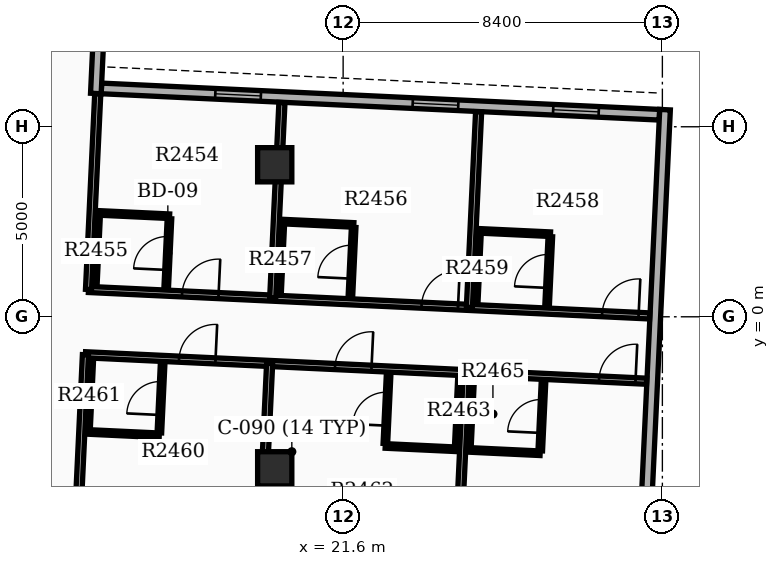
"""IFC4 building model, lengths in metres.
Left out: names, types, materials, properties, quantities, classifications, styles, units other than length and angle.
Written with IfcOpenShell. Run it as: python <this file> out.ifc"""

import sys

from ifc_helpers import new_model, si_unit, direction, frame, frame_2d, origin, origin_2d, place, context, subcontext, project, spatial, rectangle, extrude, element, fill, save


model = new_model("IFC4")
c1 = context("Model", 3, precision=1e-05, world=origin(), true_north=direction((0.0, 1.0)))
c2 = subcontext(c1, "Body", "Model", "MODEL_VIEW")
j1 = project(units=[si_unit("LENGTHUNIT", "METRE"), si_unit("PLANEANGLEUNIT", "RADIAN")], contexts=[c1])
p1 = place(None, origin())
s1 = spatial("IfcSite", under=j1, at=p1, CompositionType="ELEMENT")
p2 = place(p1, origin())
s2 = spatial("IfcBuilding", under=s1, at=p2, CompositionType="ELEMENT")
p3 = place(p2, frame((0.0, 0.0, 156.6)))
s3 = spatial("IfcBuildingStorey", under=s2, at=p3, CompositionType="ELEMENT", Elevation=156.6)
for number, where, z_axis, x_axis in (
    (1, (19.8, -4.0, 0.0), (0.0, 0.0, 1.0), (1.0, 0.0, 0.0)),
    (2, (19.8, 4.0, 0.0), (0.0, 0.0, 1.0), (1.0, 0.0, 0.0)),
):
    element("IfcColumn", number, at=place(p3, frame(where, z_axis=z_axis, x_axis=x_axis)), inside=s3, PredefinedType="COLUMN", context=c2, shape_type="SweptSolid", body=[
        extrude(rectangle(XDim=0.9, YDim=0.9, at=origin_2d()), origin(), (0.0, 0.0, 1.0), 3.9),
    ])
p4 = place(p3, frame((29.924, 5.316, 0.0), z_axis=(0.0, 0.0, 1.0), x_axis=(-0.998890124275, 0.047101163748, 0.0)))
e3 = element("IfcWall", 3, at=p4, inside=s3, PredefinedType="STANDARD", context=c2, shape_type="SweptSolid", body=[
    extrude(rectangle(XDim=14.7, YDim=0.28, at=frame_2d((7.35, 0.0))), origin(), (0.0, 0.0, 1.0), 2.97),
])
p5 = place(p4, frame((1.6, 0.0, 0.8)))
e4 = element("IfcOpeningElement", 4, at=p5, cuts=e3, PredefinedType="OPENING", context=c2, shape_type="SweptSolid", body=[
    extrude(rectangle(XDim=1.2, YDim=1.6, at=frame_2d((0.6, 0.8))), frame((0.0, 0.15, 0.0), z_axis=(0.0, -1.0, 0.0), x_axis=(1.0, 0.0, 0.0)), (0.0, 0.0, 1.0), 0.3),
])
p6 = place(p4, frame((5.3, 0.0, 0.8)))
e5 = element("IfcOpeningElement", 5, at=p6, cuts=e3, PredefinedType="OPENING", context=c2, shape_type="SweptSolid", body=[
    extrude(rectangle(XDim=1.2, YDim=1.6, at=frame_2d((0.6, 0.8))), frame((0.0, 0.15, 0.0), z_axis=(0.0, -1.0, 0.0), x_axis=(1.0, 0.0, 0.0)), (0.0, 0.0, 1.0), 0.3),
])
p7 = place(p4, frame((10.5, 0.0, 0.8)))
e6 = element("IfcOpeningElement", 6, at=p7, cuts=e3, PredefinedType="OPENING", context=c2, shape_type="SweptSolid", body=[
    extrude(rectangle(XDim=1.2, YDim=1.6, at=frame_2d((0.6, 0.8))), frame((0.0, 0.15, 0.0), z_axis=(0.0, -1.0, 0.0), x_axis=(1.0, 0.0, 0.0)), (0.0, 0.0, 1.0), 0.3),
])
p8 = place(p3, frame((29.424, -8.255, 0.0), z_axis=(0.0, 0.0, 1.0), x_axis=(0.047101845086, 0.998890092147, 0.0)))
e7 = element("IfcWall", 7, at=p8, inside=s3, PredefinedType="STANDARD", context=c2, shape_type="SweptSolid", body=[
    extrude(rectangle(XDim=13.72, YDim=0.28, at=frame_2d((6.86, 0.0))), origin(), (0.0, 0.0, 1.0), 2.97),
])
p9 = place(p8, frame((0.85, 0.0, 0.85)))
e8 = element("IfcOpeningElement", 8, at=p9, cuts=e7, PredefinedType="OPENING", context=c2, shape_type="SweptSolid", body=[
    extrude(rectangle(XDim=1.0, YDim=1.5, at=frame_2d((0.5, 0.75))), frame((0.0, 0.15, 0.0), z_axis=(0.0, -1.0, 0.0), x_axis=(1.0, 0.0, 0.0)), (0.0, 0.0, 1.0), 0.3),
])
p10 = place(p3, frame((15.094, 5.875, 0.0), z_axis=(0.0, 0.0, 1.0), x_axis=(0.04712043756, 0.998889215261, 0.0)))
e9 = element("IfcWall", 9, at=p10, inside=s3, PredefinedType="STANDARD", context=c2, shape_type="SweptSolid", body=[
    extrude(rectangle(XDim=6.86, YDim=0.28, at=frame_2d((3.43, 0.0))), origin(), (0.0, 0.0, 1.0), 2.97),
])
p11 = place(p3, frame((14.9, 0.719, 0.0), z_axis=(0.0, 0.0, 1.0), x_axis=(0.99889000272, -0.04710374153, 0.0)))
e10 = element("IfcWall", 10, at=p11, inside=s3, PredefinedType="PARTITIONING", context=c2, shape_type="SweptSolid", body=[
    extrude(rectangle(XDim=14.782, YDim=0.16, at=frame_2d((7.391, 0.0))), origin(), (0.0, 0.0, 1.0), 2.96),
])
p12 = place(p11, frame((2.465, 0.0, 0.0)))
e11 = element("IfcOpeningElement", 11, at=p12, cuts=e10, PredefinedType="OPENING", context=c2, shape_type="SweptSolid", body=[
    extrude(rectangle(XDim=0.96, YDim=2.15, at=frame_2d((0.48, 1.075))), frame((0.0, 0.09, 0.0), z_axis=(0.0, -1.0, 0.0), x_axis=(1.0, 0.0, 0.0)), (0.0, 0.0, 1.0), 0.18),
])
p13 = place(p11, frame((8.773, 0.0, 0.0)))
e12 = element("IfcOpeningElement", 12, at=p13, cuts=e10, PredefinedType="OPENING", context=c2, shape_type="SweptSolid", body=[
    extrude(rectangle(XDim=0.96, YDim=2.15, at=frame_2d((0.48, 1.075))), frame((0.0, 0.09, 0.0), z_axis=(0.0, -1.0, 0.0), x_axis=(1.0, 0.0, 0.0)), (0.0, 0.0, 1.0), 0.18),
])
p14 = place(p11, frame((13.53, 0.0, 0.0)))
e13 = element("IfcOpeningElement", 13, at=p14, cuts=e10, PredefinedType="OPENING", context=c2, shape_type="SweptSolid", body=[
    extrude(rectangle(XDim=0.96, YDim=2.15, at=frame_2d((0.48, 1.075))), frame((0.0, 0.09, 0.0), z_axis=(0.0, -1.0, 0.0), x_axis=(1.0, 0.0, 0.0)), (0.0, 0.0, 1.0), 0.18),
])
p15 = place(p3, frame((14.9, 0.719, 0.0), z_axis=(0.0, 0.0, 1.0), x_axis=(0.047103594553, 0.998890009651, 0.0)))
e14 = element("IfcWall", 14, at=p15, inside=s3, PredefinedType="PARTITIONING", context=c2, shape_type="SweptSolid", body=[
    extrude(rectangle(XDim=5.152, YDim=0.16, at=frame_2d((2.576, 0.0))), origin(), (0.0, 0.0, 1.0), 2.96),
])
p16 = place(p3, frame((19.747, 0.49, 0.0), z_axis=(0.0, 0.0, 1.0), x_axis=(0.047101364995, 0.998890114785, 0.0)))
e15 = element("IfcWall", 15, at=p16, inside=s3, PredefinedType="PARTITIONING", context=c2, shape_type="SweptSolid", body=[
    extrude(rectangle(XDim=5.152, YDim=0.16, at=frame_2d((2.576, 0.0))), origin(), (0.0, 0.0, 1.0), 2.96),
])
p17 = place(p3, frame((16.945, 0.763, 0.0), z_axis=(0.0, 0.0, 1.0), x_axis=(0.047220968666, 0.998884467853, 0.0)))
e16 = element("IfcWall", 16, at=p17, inside=s3, PredefinedType="PARTITIONING", context=c2, shape_type="SweptSolid", body=[
    extrude(rectangle(XDim=1.82, YDim=0.12, at=frame_2d((0.91, 0.0))), origin(), (0.0, 0.0, 1.0), 2.96),
])
p18 = place(p17, frame((0.47, 0.0, 0.0)))
e17 = element("IfcOpeningElement", 17, at=p18, cuts=e16, PredefinedType="OPENING", context=c2, shape_type="SweptSolid", body=[
    extrude(rectangle(XDim=0.88, YDim=2.1, at=frame_2d((0.44, 1.05))), frame((0.0, 0.07, 0.0), z_axis=(0.0, -1.0, 0.0), x_axis=(1.0, 0.0, 0.0)), (0.0, 0.0, 1.0), 0.14),
])
p19 = place(p3, frame((15.067, 0.851, 0.0), z_axis=(0.0, 0.0, 1.0), x_axis=(0.047087116047, 0.998890786574, 0.0)))
e18 = element("IfcWall", 18, at=p19, inside=s3, PredefinedType="PARTITIONING", context=c2, shape_type="SweptSolid", body=[
    extrude(rectangle(XDim=1.82, YDim=0.12, at=frame_2d((0.91, 0.0))), origin(), (0.0, 0.0, 1.0), 2.96),
])
p20 = place(p3, frame((15.156, 2.734, 0.0), z_axis=(0.0, 0.0, 1.0), x_axis=(0.998888319371, -0.047139425368, 0.0)))
e19 = element("IfcWall", 19, at=p20, inside=s3, PredefinedType="PARTITIONING", context=c2, shape_type="SweptSolid", body=[
    extrude(rectangle(XDim=1.88, YDim=0.12, at=frame_2d((0.94, 0.0))), origin(), (0.0, 0.0, 1.0), 2.96),
])
p21 = place(p3, frame((24.922, 0.246, 0.0), z_axis=(0.0, 0.0, 1.0), x_axis=(0.047056311615, 0.9988922382, 0.0)))
e20 = element("IfcWall", 20, at=p21, inside=s3, PredefinedType="PARTITIONING", context=c2, shape_type="SweptSolid", body=[
    extrude(rectangle(XDim=5.152, YDim=0.16, at=frame_2d((2.576, 0.0))), origin(), (0.0, 0.0, 1.0), 2.96),
])
p22 = place(p3, frame((21.791, 0.534, 0.0), z_axis=(0.0, 0.0, 1.0), x_axis=(0.047220968666, 0.998884467853, 0.0)))
e21 = element("IfcWall", 21, at=p22, inside=s3, PredefinedType="PARTITIONING", context=c2, shape_type="SweptSolid", body=[
    extrude(rectangle(XDim=1.82, YDim=0.12, at=frame_2d((0.91, 0.0))), origin(), (0.0, 0.0, 1.0), 2.96),
])
p23 = place(p22, frame((0.47, 0.0, 0.0)))
e22 = element("IfcOpeningElement", 22, at=p23, cuts=e21, PredefinedType="OPENING", context=c2, shape_type="SweptSolid", body=[
    extrude(rectangle(XDim=0.88, YDim=2.1, at=frame_2d((0.44, 1.05))), frame((0.0, 0.07, 0.0), z_axis=(0.0, -1.0, 0.0), x_axis=(1.0, 0.0, 0.0)), (0.0, 0.0, 1.0), 0.14),
])
p24 = place(p3, frame((19.913, 0.623, 0.0), z_axis=(0.0, 0.0, 1.0), x_axis=(0.047214641863, 0.998884766924, 0.0)))
e23 = element("IfcWall", 23, at=p24, inside=s3, PredefinedType="PARTITIONING", context=c2, shape_type="SweptSolid", body=[
    extrude(rectangle(XDim=1.82, YDim=0.12, at=frame_2d((0.91, 0.0))), origin(), (0.0, 0.0, 1.0), 2.96),
])
p25 = place(p3, frame((20.002, 2.506, 0.0), z_axis=(0.0, 0.0, 1.0), x_axis=(0.998888319371, -0.047139425368, 0.0)))
e24 = element("IfcWall", 24, at=p25, inside=s3, PredefinedType="PARTITIONING", context=c2, shape_type="SweptSolid", body=[
    extrude(rectangle(XDim=1.88, YDim=0.12, at=frame_2d((0.94, 0.0))), origin(), (0.0, 0.0, 1.0), 2.96),
])
p26 = place(p3, frame((26.967, 0.29, 0.0), z_axis=(0.0, 0.0, 1.0), x_axis=(0.047087116047, 0.998890786574, 0.0)))
e25 = element("IfcWall", 25, at=p26, inside=s3, PredefinedType="PARTITIONING", context=c2, shape_type="SweptSolid", body=[
    extrude(rectangle(XDim=1.82, YDim=0.12, at=frame_2d((0.91, 0.0))), origin(), (0.0, 0.0, 1.0), 2.96),
])
p27 = place(p26, frame((0.47, 0.0, 0.0)))
e26 = element("IfcOpeningElement", 26, at=p27, cuts=e25, PredefinedType="OPENING", context=c2, shape_type="SweptSolid", body=[
    extrude(rectangle(XDim=0.88, YDim=2.1, at=frame_2d((0.44, 1.05))), frame((0.0, 0.07, 0.0), z_axis=(0.0, -1.0, 0.0), x_axis=(1.0, 0.0, 0.0)), (0.0, 0.0, 1.0), 0.14),
])
p28 = place(p3, frame((25.089, 0.379, 0.0), z_axis=(0.0, 0.0, 1.0), x_axis=(0.047087116047, 0.998890786574, 0.0)))
e27 = element("IfcWall", 27, at=p28, inside=s3, PredefinedType="PARTITIONING", context=c2, shape_type="SweptSolid", body=[
    extrude(rectangle(XDim=1.82, YDim=0.12, at=frame_2d((0.91, 0.0))), origin(), (0.0, 0.0, 1.0), 2.96),
])
p29 = place(p3, frame((25.177, 2.261, 0.0), z_axis=(0.0, 0.0, 1.0), x_axis=(0.998888319371, -0.047139425368, 0.0)))
e28 = element("IfcWall", 28, at=p29, inside=s3, PredefinedType="PARTITIONING", context=c2, shape_type="SweptSolid", body=[
    extrude(rectangle(XDim=1.88, YDim=0.12, at=frame_2d((0.94, 0.0))), origin(), (0.0, 0.0, 1.0), 2.96),
])
p30 = place(p3, frame((14.819, -0.999, 0.0), z_axis=(0.0, 0.0, 1.0), x_axis=(0.99889000272, -0.04710374153, 0.0)))
e29 = element("IfcWall", 29, at=p30, inside=s3, PredefinedType="PARTITIONING", context=c2, shape_type="SweptSolid", body=[
    extrude(rectangle(XDim=14.782, YDim=0.16, at=frame_2d((7.391, 0.0))), origin(), (0.0, 0.0, 1.0), 2.96),
])
p31 = place(p30, frame((2.465, 0.0, 0.0)))
e30 = element("IfcOpeningElement", 30, at=p31, cuts=e29, PredefinedType="OPENING", context=c2, shape_type="SweptSolid", body=[
    extrude(rectangle(XDim=0.96, YDim=2.15, at=frame_2d((0.48, 1.075))), frame((0.0, 0.09, 0.0), z_axis=(0.0, -1.0, 0.0), x_axis=(1.0, 0.0, 0.0)), (0.0, 0.0, 1.0), 0.18),
])
p32 = place(p30, frame((6.575, 0.0, 0.0)))
e31 = element("IfcOpeningElement", 31, at=p32, cuts=e29, PredefinedType="OPENING", context=c2, shape_type="SweptSolid", body=[
    extrude(rectangle(XDim=0.96, YDim=2.15, at=frame_2d((0.48, 1.075))), frame((0.0, 0.09, 0.0), z_axis=(0.0, -1.0, 0.0), x_axis=(1.0, 0.0, 0.0)), (0.0, 0.0, 1.0), 0.18),
])
p33 = place(p30, frame((13.53, 0.0, 0.0)))
e32 = element("IfcOpeningElement", 32, at=p33, cuts=e29, PredefinedType="OPENING", context=c2, shape_type="SweptSolid", body=[
    extrude(rectangle(XDim=0.96, YDim=2.15, at=frame_2d((0.48, 1.075))), frame((0.0, 0.09, 0.0), z_axis=(0.0, -1.0, 0.0), x_axis=(1.0, 0.0, 0.0)), (0.0, 0.0, 1.0), 0.18),
])
for number, where, z_axis, x_axis in (
    (33, (14.819, -0.999, 0.0), (0.0, 0.0, 1.0), (-0.047, -0.999, 0.0)),
    (34, (19.666, -1.228, 0.0), (0.0, 0.0, 1.0), (-0.047, -0.999, 0.0)),
):
    element("IfcWall", number, at=place(p3, frame(where, z_axis=z_axis, x_axis=x_axis)), inside=s3, PredefinedType="PARTITIONING", context=c2, shape_type="SweptSolid", body=[
        extrude(rectangle(XDim=6.272, YDim=0.16, at=frame_2d((3.136, 0.0))), origin(), (0.0, 0.0, 1.0), 2.96),
    ])
p34 = place(p3, frame((16.765, -3.053, 0.0), z_axis=(0.0, 0.0, 1.0), x_axis=(0.047087116047, 0.998890786574, 0.0)))
e35 = element("IfcWall", 35, at=p34, inside=s3, PredefinedType="PARTITIONING", context=c2, shape_type="SweptSolid", body=[
    extrude(rectangle(XDim=1.82, YDim=0.12, at=frame_2d((0.91, 0.0))), origin(), (0.0, 0.0, 1.0), 2.96),
])
p35 = place(p34, frame((0.47, 0.0, 0.0)))
e36 = element("IfcOpeningElement", 36, at=p35, cuts=e35, PredefinedType="OPENING", context=c2, shape_type="SweptSolid", body=[
    extrude(rectangle(XDim=0.88, YDim=2.1, at=frame_2d((0.44, 1.05))), frame((0.0, 0.07, 0.0), z_axis=(0.0, -1.0, 0.0), x_axis=(1.0, 0.0, 0.0)), (0.0, 0.0, 1.0), 0.14),
])
p36 = place(p3, frame((14.887, -2.965, 0.0), z_axis=(0.0, 0.0, 1.0), x_axis=(0.047080807099, 0.998891083954, 0.0)))
e37 = element("IfcWall", 37, at=p36, inside=s3, PredefinedType="PARTITIONING", context=c2, shape_type="SweptSolid", body=[
    extrude(rectangle(XDim=1.82, YDim=0.12, at=frame_2d((0.91, 0.0))), origin(), (0.0, 0.0, 1.0), 2.96),
])
p37 = place(p3, frame((14.884, -3.03, 0.0), z_axis=(0.0, 0.0, 1.0), x_axis=(0.998894425757, -0.04700985207, 0.0)))
e38 = element("IfcWall", 38, at=p37, inside=s3, PredefinedType="PARTITIONING", context=c2, shape_type="SweptSolid", body=[
    extrude(rectangle(XDim=1.88, YDim=0.12, at=frame_2d((0.94, 0.0))), origin(), (0.0, 0.0, 1.0), 2.96),
])
p38 = place(p3, frame((24.841, -1.472, 0.0), z_axis=(0.0, 0.0, 1.0), x_axis=(-0.047099102485, -0.998890221468, 0.0)))
e39 = element("IfcWall", 39, at=p38, inside=s3, PredefinedType="PARTITIONING", context=c2, shape_type="SweptSolid", body=[
    extrude(rectangle(XDim=6.272, YDim=0.16, at=frame_2d((3.136, 0.0))), origin(), (0.0, 0.0, 1.0), 2.96),
])
p39 = place(p3, frame((22.711, -3.333, 0.0), z_axis=(0.0, 0.0, 1.0), x_axis=(0.047087116047, 0.998890786574, 0.0)))
e40 = element("IfcWall", 40, at=p39, inside=s3, PredefinedType="PARTITIONING", context=c2, shape_type="SweptSolid", body=[
    extrude(rectangle(XDim=1.82, YDim=0.12, at=frame_2d((0.91, 0.0))), origin(), (0.0, 0.0, 1.0), 2.96),
])
p40 = place(p39, frame((0.47, 0.0, 0.0)))
e41 = element("IfcOpeningElement", 41, at=p40, cuts=e40, PredefinedType="OPENING", context=c2, shape_type="SweptSolid", body=[
    extrude(rectangle(XDim=0.88, YDim=2.1, at=frame_2d((0.44, 1.05))), frame((0.0, 0.07, 0.0), z_axis=(0.0, -1.0, 0.0), x_axis=(1.0, 0.0, 0.0)), (0.0, 0.0, 1.0), 0.14),
])
p41 = place(p3, frame((24.589, -3.422, 0.0), z_axis=(0.0, 0.0, 1.0), x_axis=(0.047080807099, 0.998891083954, 0.0)))
e42 = element("IfcWall", 42, at=p41, inside=s3, PredefinedType="PARTITIONING", context=c2, shape_type="SweptSolid", body=[
    extrude(rectangle(XDim=1.82, YDim=0.12, at=frame_2d((0.91, 0.0))), origin(), (0.0, 0.0, 1.0), 2.96),
])
p42 = place(p3, frame((22.708, -3.398, 0.0), z_axis=(0.0, 0.0, 1.0), x_axis=(0.998888319371, -0.047139425368, 0.0)))
e43 = element("IfcWall", 43, at=p42, inside=s3, PredefinedType="PARTITIONING", context=c2, shape_type="SweptSolid", body=[
    extrude(rectangle(XDim=1.88, YDim=0.12, at=frame_2d((0.94, 0.0))), origin(), (0.0, 0.0, 1.0), 2.96),
])
p43 = place(p3, frame((26.787, -3.526, 0.0), z_axis=(0.0, 0.0, 1.0), x_axis=(0.047087116047, 0.998890786574, 0.0)))
e44 = element("IfcWall", 44, at=p43, inside=s3, PredefinedType="PARTITIONING", context=c2, shape_type="SweptSolid", body=[
    extrude(rectangle(XDim=1.82, YDim=0.12, at=frame_2d((0.91, 0.0))), origin(), (0.0, 0.0, 1.0), 2.96),
])
p44 = place(p43, frame((0.47, 0.0, 0.0)))
e45 = element("IfcOpeningElement", 45, at=p44, cuts=e44, PredefinedType="OPENING", context=c2, shape_type="SweptSolid", body=[
    extrude(rectangle(XDim=0.88, YDim=2.1, at=frame_2d((0.44, 1.05))), frame((0.0, 0.07, 0.0), z_axis=(0.0, -1.0, 0.0), x_axis=(1.0, 0.0, 0.0)), (0.0, 0.0, 1.0), 0.14),
])
p45 = place(p3, frame((24.909, -3.437, 0.0), z_axis=(0.0, 0.0, 1.0), x_axis=(0.047080807099, 0.998891083954, 0.0)))
e46 = element("IfcWall", 46, at=p45, inside=s3, PredefinedType="PARTITIONING", context=c2, shape_type="SweptSolid", body=[
    extrude(rectangle(XDim=1.82, YDim=0.12, at=frame_2d((0.91, 0.0))), origin(), (0.0, 0.0, 1.0), 2.96),
])
p46 = place(p3, frame((24.906, -3.502, 0.0), z_axis=(0.0, 0.0, 1.0), x_axis=(0.998888319371, -0.047139425368, 0.0)))
e47 = element("IfcWall", 47, at=p46, inside=s3, PredefinedType="PARTITIONING", context=c2, shape_type="SweptSolid", body=[
    extrude(rectangle(XDim=1.88, YDim=0.12, at=frame_2d((0.94, 0.0))), origin(), (0.0, 0.0, 1.0), 2.96),
])
p47 = place(p5, origin())
e48 = element("IfcWindow", 48, at=p47, inside=s3, PartitioningType="SINGLE_PANEL", PredefinedType="WINDOW", context=c2, shape_type="SweptSolid", body=[
    extrude(rectangle(XDim=1.2, YDim=1.6, at=frame_2d((0.6, 0.8))), frame((0.0, 0.03, 0.0), z_axis=(0.0, -1.0, 0.0), x_axis=(1.0, 0.0, 0.0)), (0.0, 0.0, 1.0), 0.06),
])
fill(e4, e48)
p48 = place(p6, origin())
e49 = element("IfcWindow", 49, at=p48, inside=s3, PartitioningType="SINGLE_PANEL", PredefinedType="WINDOW", context=c2, shape_type="SweptSolid", body=[
    extrude(rectangle(XDim=1.2, YDim=1.6, at=frame_2d((0.6, 0.8))), frame((0.0, 0.03, 0.0), z_axis=(0.0, -1.0, 0.0), x_axis=(1.0, 0.0, 0.0)), (0.0, 0.0, 1.0), 0.06),
])
fill(e5, e49)
p49 = place(p7, origin())
e50 = element("IfcWindow", 50, at=p49, inside=s3, PartitioningType="SINGLE_PANEL", PredefinedType="WINDOW", context=c2, shape_type="SweptSolid", body=[
    extrude(rectangle(XDim=1.2, YDim=1.6, at=frame_2d((0.6, 0.8))), frame((0.0, 0.03, 0.0), z_axis=(0.0, -1.0, 0.0), x_axis=(1.0, 0.0, 0.0)), (0.0, 0.0, 1.0), 0.06),
])
fill(e6, e50)
p50 = place(p12, origin())
e51 = element("IfcDoor", 51, at=p50, inside=s3, OperationType="SINGLE_SWING_RIGHT", PredefinedType="DOOR", context=c2, shape_type="SweptSolid", body=[
    extrude(rectangle(XDim=0.96, YDim=2.15, at=frame_2d((0.48, 1.075))), frame((0.0, 0.025, 0.0), z_axis=(0.0, -1.0, 0.0), x_axis=(1.0, 0.0, 0.0)), (0.0, 0.0, 1.0), 0.05),
])
fill(e11, e51)
p51 = place(p18, origin())
e52 = element("IfcDoor", 52, at=p51, inside=s3, OperationType="SINGLE_SWING_LEFT", PredefinedType="DOOR", context=c2, shape_type="SweptSolid", body=[
    extrude(rectangle(XDim=0.88, YDim=2.1, at=frame_2d((0.44, 1.05))), frame((0.0, 0.025, 0.0), z_axis=(0.0, -1.0, 0.0), x_axis=(1.0, 0.0, 0.0)), (0.0, 0.0, 1.0), 0.05),
])
fill(e17, e52)
p52 = place(p13, origin())
e53 = element("IfcDoor", 53, at=p52, inside=s3, OperationType="SINGLE_SWING_RIGHT", PredefinedType="DOOR", context=c2, shape_type="SweptSolid", body=[
    extrude(rectangle(XDim=0.96, YDim=2.15, at=frame_2d((0.48, 1.075))), frame((0.0, 0.025, 0.0), z_axis=(0.0, -1.0, 0.0), x_axis=(1.0, 0.0, 0.0)), (0.0, 0.0, 1.0), 0.05),
])
fill(e12, e53)
p53 = place(p23, origin())
e54 = element("IfcDoor", 54, at=p53, inside=s3, OperationType="SINGLE_SWING_LEFT", PredefinedType="DOOR", context=c2, shape_type="SweptSolid", body=[
    extrude(rectangle(XDim=0.88, YDim=2.1, at=frame_2d((0.44, 1.05))), frame((0.0, 0.025, 0.0), z_axis=(0.0, -1.0, 0.0), x_axis=(1.0, 0.0, 0.0)), (0.0, 0.0, 1.0), 0.05),
])
fill(e22, e54)
p54 = place(p14, origin())
e55 = element("IfcDoor", 55, at=p54, inside=s3, OperationType="SINGLE_SWING_RIGHT", PredefinedType="DOOR", context=c2, shape_type="SweptSolid", body=[
    extrude(rectangle(XDim=0.96, YDim=2.15, at=frame_2d((0.48, 1.075))), frame((0.0, 0.025, 0.0), z_axis=(0.0, -1.0, 0.0), x_axis=(1.0, 0.0, 0.0)), (0.0, 0.0, 1.0), 0.05),
])
fill(e13, e55)
p55 = place(p27, origin())
e56 = element("IfcDoor", 56, at=p55, inside=s3, OperationType="SINGLE_SWING_LEFT", PredefinedType="DOOR", context=c2, shape_type="SweptSolid", body=[
    extrude(rectangle(XDim=0.88, YDim=2.1, at=frame_2d((0.44, 1.05))), frame((0.0, 0.025, 0.0), z_axis=(0.0, -1.0, 0.0), x_axis=(1.0, 0.0, 0.0)), (0.0, 0.0, 1.0), 0.05),
])
fill(e26, e56)
p56 = place(p31, origin())
e57 = element("IfcDoor", 57, at=p56, inside=s3, OperationType="SINGLE_SWING_RIGHT", PredefinedType="DOOR", context=c2, shape_type="SweptSolid", body=[
    extrude(rectangle(XDim=0.96, YDim=2.15, at=frame_2d((0.48, 1.075))), frame((0.0, 0.025, 0.0), z_axis=(0.0, -1.0, 0.0), x_axis=(1.0, 0.0, 0.0)), (0.0, 0.0, 1.0), 0.05),
])
fill(e30, e57)
p57 = place(p35, origin())
e58 = element("IfcDoor", 58, at=p57, inside=s3, OperationType="SINGLE_SWING_LEFT", PredefinedType="DOOR", context=c2, shape_type="SweptSolid", body=[
    extrude(rectangle(XDim=0.88, YDim=2.1, at=frame_2d((0.44, 1.05))), frame((0.0, 0.025, 0.0), z_axis=(0.0, -1.0, 0.0), x_axis=(1.0, 0.0, 0.0)), (0.0, 0.0, 1.0), 0.05),
])
fill(e36, e58)
p58 = place(p32, origin())
e59 = element("IfcDoor", 59, at=p58, inside=s3, OperationType="SINGLE_SWING_RIGHT", PredefinedType="DOOR", context=c2, shape_type="SweptSolid", body=[
    extrude(rectangle(XDim=0.96, YDim=2.15, at=frame_2d((0.48, 1.075))), frame((0.0, 0.025, 0.0), z_axis=(0.0, -1.0, 0.0), x_axis=(1.0, 0.0, 0.0)), (0.0, 0.0, 1.0), 0.05),
])
fill(e31, e59)
p59 = place(p40, origin())
e60 = element("IfcDoor", 60, at=p59, inside=s3, OperationType="SINGLE_SWING_LEFT", PredefinedType="DOOR", context=c2, shape_type="SweptSolid", body=[
    extrude(rectangle(XDim=0.88, YDim=2.1, at=frame_2d((0.44, 1.05))), frame((0.0, 0.025, 0.0), z_axis=(0.0, -1.0, 0.0), x_axis=(1.0, 0.0, 0.0)), (0.0, 0.0, 1.0), 0.05),
])
fill(e41, e60)
p60 = place(p33, origin())
e61 = element("IfcDoor", 61, at=p60, inside=s3, OperationType="SINGLE_SWING_RIGHT", PredefinedType="DOOR", context=c2, shape_type="SweptSolid", body=[
    extrude(rectangle(XDim=0.96, YDim=2.15, at=frame_2d((0.48, 1.075))), frame((0.0, 0.025, 0.0), z_axis=(0.0, -1.0, 0.0), x_axis=(1.0, 0.0, 0.0)), (0.0, 0.0, 1.0), 0.05),
])
fill(e32, e61)
p61 = place(p44, origin())
e62 = element("IfcDoor", 62, at=p61, inside=s3, OperationType="SINGLE_SWING_LEFT", PredefinedType="DOOR", context=c2, shape_type="SweptSolid", body=[
    extrude(rectangle(XDim=0.88, YDim=2.1, at=frame_2d((0.44, 1.05))), frame((0.0, 0.025, 0.0), z_axis=(0.0, -1.0, 0.0), x_axis=(1.0, 0.0, 0.0)), (0.0, 0.0, 1.0), 0.05),
])
fill(e45, e62)
save(model, sys.argv[1])
